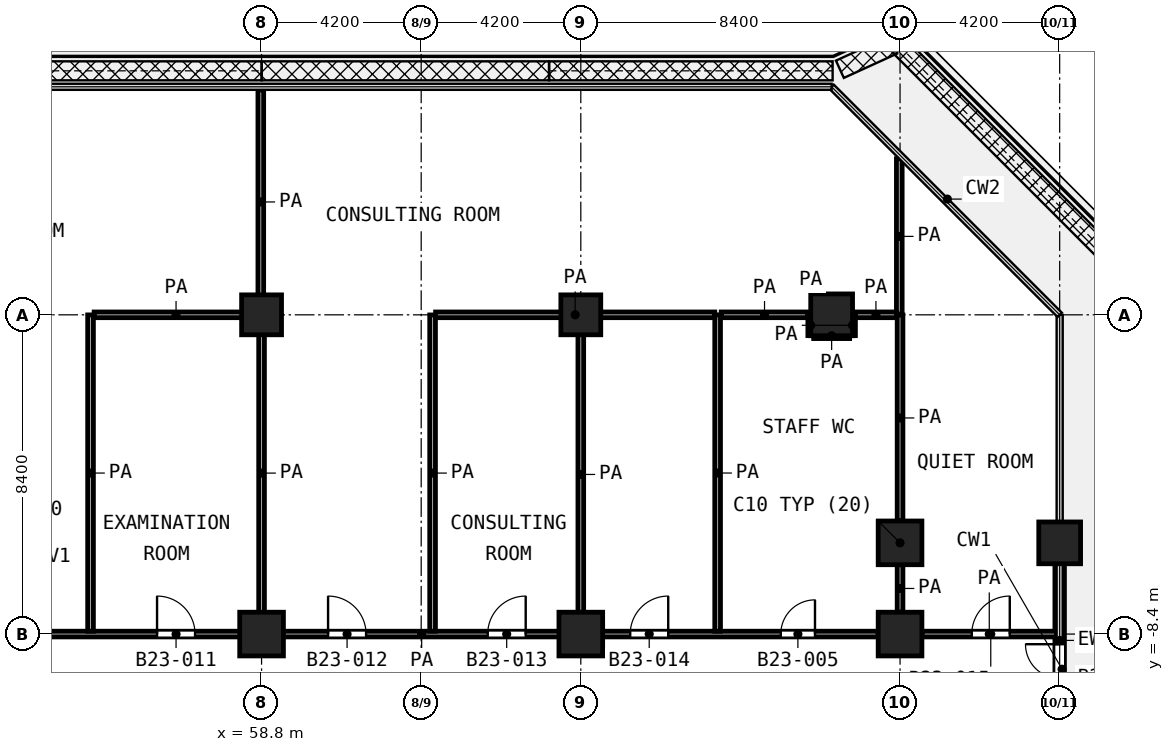
"""IFC4 building model, lengths in metres.
Left out: names, types, materials, properties, quantities, classifications, styles, units other than length and angle.
Written with IfcOpenShell. Run it as: python <this file> out.ifc"""

import sys

from ifc_helpers import new_model, si_unit, direction, frame, frame_2d, origin, origin_2d, place, context, subcontext, project, spatial, rectangle, extrude, element, fill, save


model = new_model("IFC4")
c1 = context("Model", 3, precision=1e-05, world=origin(), true_north=direction((0.0, 1.0)))
c2 = subcontext(c1, "Body", "Model", "MODEL_VIEW")
j1 = project(units=[si_unit("LENGTHUNIT", "METRE"), si_unit("PLANEANGLEUNIT", "RADIAN")], contexts=[c1])
p1 = place(None, origin())
s1 = spatial("IfcSite", under=j1, at=p1, CompositionType="ELEMENT")
p2 = place(p1, origin())
s2 = spatial("IfcBuilding", under=s1, at=p2, CompositionType="ELEMENT")
p3 = place(p2, frame((0.0, 0.0, 103.0)))
s3 = spatial("IfcBuildingStorey", under=s2, at=p3, CompositionType="ELEMENT", Elevation=103.0)
for number, where, z_axis, x_axis in (
    (1, (58.8, 0.0, 0.0), (0.0, 0.0, 1.0), (1.0, 0.0, 0.0)),
    (2, (67.2, 0.0, 0.0), (0.0, 0.0, 1.0), (1.0, 0.0, 0.0)),
):
    element("IfcColumn", number, at=place(p3, frame(where, z_axis=z_axis, x_axis=x_axis)), inside=s3, PredefinedType="COLUMN", context=c2, shape_type="SweptSolid", body=[
        extrude(rectangle(XDim=1.05, YDim=1.05, at=origin_2d()), origin(), (0.0, 0.0, 1.0), 4.2),
    ])
p4 = place(p3, frame((73.8, 0.0, 0.0), z_axis=(0.0, 0.0, 1.0), x_axis=(1.0, 0.0, 0.0)))
e3 = element("IfcColumn", 3, at=p4, inside=s3, PredefinedType="COLUMN", context=c2, shape_type="SweptSolid", body=[
    extrude(rectangle(XDim=1.1, YDim=1.1, at=origin_2d()), origin(), (0.0, 0.0, 1.0), 4.2),
])
p5 = place(p3, frame((75.6, -6.0, 0.0), z_axis=(0.0, 0.0, 1.0), x_axis=(1.0, 0.0, 0.0)))
e4 = element("IfcColumn", 4, at=p5, inside=s3, PredefinedType="COLUMN", context=c2, shape_type="SweptSolid", body=[
    extrude(rectangle(XDim=1.15, YDim=1.15, at=origin_2d()), origin(), (0.0, 0.0, 1.0), 4.2),
])
p6 = place(p3, frame((79.8, -6.0, 0.0), z_axis=(0.0, 0.0, 1.0), x_axis=(1.0, 0.0, 0.0)))
e5 = element("IfcColumn", 5, at=p6, inside=s3, PredefinedType="COLUMN", context=c2, shape_type="SweptSolid", body=[
    extrude(rectangle(XDim=1.1, YDim=1.1, at=origin_2d()), origin(), (0.0, 0.0, 1.0), 4.2),
])
for number, where, z_axis, x_axis in (
    (6, (58.8, -8.4, 0.0), (0.0, 0.0, 1.0), (1.0, 0.0, 0.0)),
    (7, (67.2, -8.4, 0.0), (0.0, 0.0, 1.0), (1.0, 0.0, 0.0)),
    (8, (75.6, -8.4, 0.0), (0.0, 0.0, 1.0), (1.0, 0.0, 0.0)),
):
    element("IfcColumn", number, at=place(p3, frame(where, z_axis=z_axis, x_axis=x_axis)), inside=s3, PredefinedType="COLUMN", context=c2, shape_type="SweptSolid", body=[
        extrude(rectangle(XDim=1.15, YDim=1.15, at=origin_2d()), origin(), (0.0, 0.0, 1.0), 4.2),
    ])
p7 = place(p3, frame((79.8, -10.583, 0.0), z_axis=(0.0, 0.0, 1.0), x_axis=(0.0, 1.0, 0.0)))
e9 = element("IfcWall", 9, at=p7, inside=s3, PredefinedType="SOLIDWALL", context=c2, shape_type="SweptSolid", body=[
    extrude(rectangle(XDim=4.033, YDim=0.25, at=frame_2d((2.017, 0.0))), origin(), (0.0, 0.0, 1.0), 3.48),
])
p8 = place(p7, frame((0.117, 0.0, 0.0)))
e10 = element("IfcOpeningElement", 10, at=p8, cuts=e9, PredefinedType="OPENING", context=c2, shape_type="SweptSolid", body=[
    extrude(rectangle(XDim=1.8, YDim=2.1, at=frame_2d((0.9, 1.05))), frame((0.0, 0.135, 0.0), z_axis=(0.0, -1.0, 0.0), x_axis=(1.0, 0.0, 0.0)), (0.0, 0.0, 1.0), 0.27),
])
p9 = place(p3, frame((51.0, -8.4, 0.0), z_axis=(0.0, 0.0, 1.0), x_axis=(1.0, 0.0, 0.0)))
e11 = element("IfcWall", 11, at=p9, inside=s3, PredefinedType="PARTITIONING", context=c2, shape_type="SweptSolid", body=[
    extrude(rectangle(XDim=24.025, YDim=0.15, at=frame_2d((12.012, 0.0))), origin(), (0.0, 0.0, 1.0), 3.6),
])
p10 = place(p9, frame((5.05, 0.0, 0.0)))
e12 = element("IfcOpeningElement", 12, at=p10, cuts=e11, PredefinedType="OPENING", context=c2, shape_type="SweptSolid", body=[
    extrude(rectangle(XDim=1.0, YDim=2.1, at=frame_2d((0.5, 1.05))), frame((0.0, 0.085, 0.0), z_axis=(0.0, -1.0, 0.0), x_axis=(1.0, 0.0, 0.0)), (0.0, 0.0, 1.0), 0.17),
])
p11 = place(p9, frame((9.55, 0.0, 0.0)))
e13 = element("IfcOpeningElement", 13, at=p11, cuts=e11, PredefinedType="OPENING", context=c2, shape_type="SweptSolid", body=[
    extrude(rectangle(XDim=1.0, YDim=2.1, at=frame_2d((0.5, 1.05))), frame((0.0, 0.085, 0.0), z_axis=(0.0, -1.0, 0.0), x_axis=(1.0, 0.0, 0.0)), (0.0, 0.0, 1.0), 0.17),
])
p12 = place(p9, frame((13.75, 0.0, 0.0)))
e14 = element("IfcOpeningElement", 14, at=p12, cuts=e11, PredefinedType="OPENING", context=c2, shape_type="SweptSolid", body=[
    extrude(rectangle(XDim=1.0, YDim=2.1, at=frame_2d((0.5, 1.05))), frame((0.0, 0.085, 0.0), z_axis=(0.0, -1.0, 0.0), x_axis=(1.0, 0.0, 0.0)), (0.0, 0.0, 1.0), 0.17),
])
p13 = place(p9, frame((17.5, 0.0, 0.0)))
e15 = element("IfcOpeningElement", 15, at=p13, cuts=e11, PredefinedType="OPENING", context=c2, shape_type="SweptSolid", body=[
    extrude(rectangle(XDim=1.0, YDim=2.1, at=frame_2d((0.5, 1.05))), frame((0.0, 0.085, 0.0), z_axis=(0.0, -1.0, 0.0), x_axis=(1.0, 0.0, 0.0)), (0.0, 0.0, 1.0), 0.17),
])
p14 = place(p9, frame((21.462, 0.0, 0.0)))
e16 = element("IfcOpeningElement", 16, at=p14, cuts=e11, PredefinedType="OPENING", context=c2, shape_type="SweptSolid", body=[
    extrude(rectangle(XDim=0.9, YDim=2.1, at=frame_2d((0.45, 1.05))), frame((0.0, 0.085, 0.0), z_axis=(0.0, -1.0, 0.0), x_axis=(1.0, 0.0, 0.0)), (0.0, 0.0, 1.0), 0.17),
])
p15 = place(p3, frame((76.175, -8.4, 0.0), z_axis=(0.0, 0.0, 1.0), x_axis=(1.0, 0.0, 0.0)))
e17 = element("IfcWall", 17, at=p15, inside=s3, PredefinedType="PARTITIONING", context=c2, shape_type="SweptSolid", body=[
    extrude(rectangle(XDim=3.545, YDim=0.15, at=frame_2d((1.772, 0.0))), origin(), (0.0, 0.0, 1.0), 3.6),
])
p16 = place(p15, frame((1.312, 0.0, 0.0)))
e18 = element("IfcOpeningElement", 18, at=p16, cuts=e17, PredefinedType="OPENING", context=c2, shape_type="SweptSolid", body=[
    extrude(rectangle(XDim=1.0, YDim=2.1, at=frame_2d((0.5, 1.05))), frame((0.0, 0.085, 0.0), z_axis=(0.0, -1.0, 0.0), x_axis=(1.0, 0.0, 0.0)), (0.0, 0.0, 1.0), 0.17),
])
p17 = place(p3, frame((73.327, -0.55, 0.0), z_axis=(0.0, 0.0, 1.0), x_axis=(1.0, 0.0, 0.0)))
e19 = element("IfcWall", 19, at=p17, inside=s3, PredefinedType="PARTITIONING", context=c2, shape_type="SweptSolid", body=[
    extrude(rectangle(XDim=0.946, YDim=0.15, at=frame_2d((0.473, 0.0))), origin(), (0.0, 0.0, 1.0), 3.6),
])
p18 = place(p3, frame((54.395, 0.0, 0.0), z_axis=(0.0, 0.0, 1.0), x_axis=(1.0, 0.0, 0.0)))
e20 = element("IfcWall", 20, at=p18, inside=s3, PredefinedType="PARTITIONING", context=c2, shape_type="SweptSolid", body=[
    extrude(rectangle(XDim=4.31, YDim=0.15, at=frame_2d((2.155, 0.0))), origin(), (0.0, 0.0, 1.0), 3.6),
])
p19 = place(p3, frame((63.379, 0.0, 0.0), z_axis=(0.0, 0.0, 1.0), x_axis=(1.0, 0.0, 0.0)))
e21 = element("IfcWall", 21, at=p19, inside=s3, PredefinedType="PARTITIONING", context=c2, shape_type="SweptSolid", body=[
    extrude(rectangle(XDim=7.346, YDim=0.15, at=frame_2d((3.673, 0.0))), origin(), (0.0, 0.0, 1.0), 3.6),
])
p20 = place(p3, frame((70.895, 0.0, 0.0), z_axis=(0.0, 0.0, 1.0), x_axis=(1.0, 0.0, 0.0)))
e22 = element("IfcWall", 22, at=p20, inside=s3, PredefinedType="PARTITIONING", context=c2, shape_type="SweptSolid", body=[
    extrude(rectangle(XDim=2.278, YDim=0.15, at=frame_2d((1.139, 0.0))), origin(), (0.0, 0.0, 1.0), 3.6),
])
p21 = place(p3, frame((74.426, 0.0, 0.0), z_axis=(0.0, 0.0, 1.0), x_axis=(1.0, 0.0, 0.0)))
e23 = element("IfcWall", 23, at=p21, inside=s3, PredefinedType="PARTITIONING", context=c2, shape_type="SweptSolid", body=[
    extrude(rectangle(XDim=1.079, YDim=0.15, at=frame_2d((0.54, 0.0))), origin(), (0.0, 0.0, 1.0), 3.6),
])
p22 = place(p3, frame((54.3, -8.325, 0.0), z_axis=(0.0, 0.0, 1.0), x_axis=(0.0, 1.0, 0.0)))
e24 = element("IfcWall", 24, at=p22, inside=s3, PredefinedType="PARTITIONING", context=c2, shape_type="SweptSolid", body=[
    extrude(rectangle(XDim=8.323, YDim=0.15, at=frame_2d((4.162, 0.0))), origin(), (0.0, 0.0, 1.0), 3.6),
])
p23 = place(p3, frame((58.78, 0.02, 0.0), z_axis=(0.0, 0.0, 1.0), x_axis=(0.0, 1.0, 0.0)))
e25 = element("IfcWall", 25, at=p23, inside=s3, PredefinedType="PARTITIONING", context=c2, shape_type="SweptSolid", body=[
    extrude(rectangle(XDim=5.9, YDim=0.15, at=frame_2d((2.95, 0.0))), origin(), (0.0, 0.0, 1.0), 3.6),
])
p24 = place(p3, frame((58.8, -8.325, 0.0), z_axis=(0.0, 0.0, 1.0), x_axis=(0.0, 1.0, 0.0)))
e26 = element("IfcWall", 26, at=p24, inside=s3, PredefinedType="PARTITIONING", context=c2, shape_type="SweptSolid", body=[
    extrude(rectangle(XDim=8.321, YDim=0.15, at=frame_2d((4.161, 0.0))), origin(), (0.0, 0.0, 1.0), 3.6),
])
p25 = place(p3, frame((63.3, -8.325, 0.0), z_axis=(0.0, 0.0, 1.0), x_axis=(0.0, 1.0, 0.0)))
e27 = element("IfcWall", 27, at=p25, inside=s3, PredefinedType="PARTITIONING", context=c2, shape_type="SweptSolid", body=[
    extrude(rectangle(XDim=8.322, YDim=0.15, at=frame_2d((4.161, 0.0))), origin(), (0.0, 0.0, 1.0), 3.6),
])
p26 = place(p3, frame((67.2, -8.325, 0.0), z_axis=(0.0, 0.0, 1.0), x_axis=(0.0, 1.0, 0.0)))
e28 = element("IfcWall", 28, at=p26, inside=s3, PredefinedType="PARTITIONING", context=c2, shape_type="SweptSolid", body=[
    extrude(rectangle(XDim=8.25, YDim=0.15, at=frame_2d((4.125, 0.0))), origin(), (0.0, 0.0, 1.0), 3.6),
])
p27 = place(p3, frame((70.8, -8.325, 0.0), z_axis=(0.0, 0.0, 1.0), x_axis=(0.0, 1.0, 0.0)))
e29 = element("IfcWall", 29, at=p27, inside=s3, PredefinedType="PARTITIONING", context=c2, shape_type="SweptSolid", body=[
    extrude(rectangle(XDim=8.325, YDim=0.15, at=frame_2d((4.163, 0.0))), origin(), (0.0, 0.0, 1.0), 3.6),
])
p28 = place(p3, frame((73.25, -0.547, 0.0), z_axis=(0.0, 0.0, 1.0), x_axis=(0.0, 1.0, 0.0)))
e30 = element("IfcWall", 30, at=p28, inside=s3, PredefinedType="PARTITIONING", context=c2, shape_type="SweptSolid", body=[
    extrude(rectangle(XDim=0.545, YDim=0.15, at=frame_2d((0.272, 0.0))), origin(), (0.0, 0.0, 1.0), 3.6),
])
p29 = place(p3, frame((74.35, -0.548, 0.0), z_axis=(0.0, 0.0, 1.0), x_axis=(0.0, 1.0, 0.0)))
e31 = element("IfcWall", 31, at=p29, inside=s3, PredefinedType="PARTITIONING", context=c2, shape_type="SweptSolid", body=[
    extrude(rectangle(XDim=0.546, YDim=0.15, at=frame_2d((0.273, 0.0))), origin(), (0.0, 0.0, 1.0), 3.6),
])
p30 = place(p3, frame((75.58, 0.02, 0.0), z_axis=(0.0, 0.0, 1.0), x_axis=(0.0, 1.0, 0.0)))
e32 = element("IfcWall", 32, at=p30, inside=s3, PredefinedType="PARTITIONING", context=c2, shape_type="SweptSolid", body=[
    extrude(rectangle(XDim=4.087, YDim=0.15, at=frame_2d((2.043, 0.0))), origin(), (0.0, 0.0, 1.0), 3.6),
])
p31 = place(p3, frame((75.6, -7.825, 0.0), z_axis=(0.0, 0.0, 1.0), x_axis=(0.0, 1.0, 0.0)))
e33 = element("IfcWall", 33, at=p31, inside=s3, PredefinedType="PARTITIONING", context=c2, shape_type="SweptSolid", body=[
    extrude(rectangle(XDim=1.25, YDim=0.15, at=frame_2d((0.625, 0.0))), origin(), (0.0, 0.0, 1.0), 3.6),
])
p32 = place(p3, frame((75.6, -5.425, 0.0), z_axis=(0.0, 0.0, 1.0), x_axis=(0.0, 1.0, 0.0)))
e34 = element("IfcWall", 34, at=p32, inside=s3, PredefinedType="PARTITIONING", context=c2, shape_type="SweptSolid", body=[
    extrude(rectangle(XDim=5.423, YDim=0.15, at=frame_2d((2.711, 0.0))), origin(), (0.0, 0.0, 1.0), 3.6),
])
p33 = place(p8, origin())
e35 = element("IfcDoor", 35, at=p33, inside=s3, OperationType="DOUBLE_DOOR_SINGLE_SWING", PredefinedType="DOOR", context=c2, shape_type="SweptSolid", body=[
    extrude(rectangle(XDim=1.8, YDim=2.1, at=frame_2d((0.9, 1.05))), frame((0.0, 0.025, 0.0), z_axis=(0.0, -1.0, 0.0), x_axis=(1.0, 0.0, 0.0)), (0.0, 0.0, 1.0), 0.05),
])
fill(e10, e35)
p34 = place(p10, origin())
e36 = element("IfcDoor", 36, at=p34, inside=s3, OperationType="SINGLE_SWING_LEFT", PredefinedType="DOOR", context=c2, shape_type="SweptSolid", body=[
    extrude(rectangle(XDim=1.0, YDim=2.1, at=frame_2d((0.5, 1.05))), frame((0.0, 0.025, 0.0), z_axis=(0.0, -1.0, 0.0), x_axis=(1.0, 0.0, 0.0)), (0.0, 0.0, 1.0), 0.05),
])
fill(e12, e36)
p35 = place(p11, origin())
e37 = element("IfcDoor", 37, at=p35, inside=s3, OperationType="SINGLE_SWING_LEFT", PredefinedType="DOOR", context=c2, shape_type="SweptSolid", body=[
    extrude(rectangle(XDim=1.0, YDim=2.1, at=frame_2d((0.5, 1.05))), frame((0.0, 0.025, 0.0), z_axis=(0.0, -1.0, 0.0), x_axis=(1.0, 0.0, 0.0)), (0.0, 0.0, 1.0), 0.05),
])
fill(e13, e37)
p36 = place(p12, origin())
e38 = element("IfcDoor", 38, at=p36, inside=s3, OperationType="SINGLE_SWING_RIGHT", PredefinedType="DOOR", context=c2, shape_type="SweptSolid", body=[
    extrude(rectangle(XDim=1.0, YDim=2.1, at=frame_2d((0.5, 1.05))), frame((0.0, 0.025, 0.0), z_axis=(0.0, -1.0, 0.0), x_axis=(1.0, 0.0, 0.0)), (0.0, 0.0, 1.0), 0.05),
])
fill(e14, e38)
p37 = place(p13, origin())
e39 = element("IfcDoor", 39, at=p37, inside=s3, OperationType="SINGLE_SWING_RIGHT", PredefinedType="DOOR", context=c2, shape_type="SweptSolid", body=[
    extrude(rectangle(XDim=1.0, YDim=2.1, at=frame_2d((0.5, 1.05))), frame((0.0, 0.025, 0.0), z_axis=(0.0, -1.0, 0.0), x_axis=(1.0, 0.0, 0.0)), (0.0, 0.0, 1.0), 0.05),
])
fill(e15, e39)
p38 = place(p14, origin())
e40 = element("IfcDoor", 40, at=p38, inside=s3, OperationType="SINGLE_SWING_RIGHT", PredefinedType="DOOR", context=c2, shape_type="SweptSolid", body=[
    extrude(rectangle(XDim=0.9, YDim=2.1, at=frame_2d((0.45, 1.05))), frame((0.0, 0.025, 0.0), z_axis=(0.0, -1.0, 0.0), x_axis=(1.0, 0.0, 0.0)), (0.0, 0.0, 1.0), 0.05),
])
fill(e16, e40)
p39 = place(p16, origin())
e41 = element("IfcDoor", 41, at=p39, inside=s3, OperationType="SINGLE_SWING_RIGHT", PredefinedType="DOOR", context=c2, shape_type="SweptSolid", body=[
    extrude(rectangle(XDim=1.0, YDim=2.1, at=frame_2d((0.5, 1.05))), frame((0.0, 0.025, 0.0), z_axis=(0.0, -1.0, 0.0), x_axis=(1.0, 0.0, 0.0)), (0.0, 0.0, 1.0), 0.05),
])
fill(e18, e41)
save(model, sys.argv[1])
